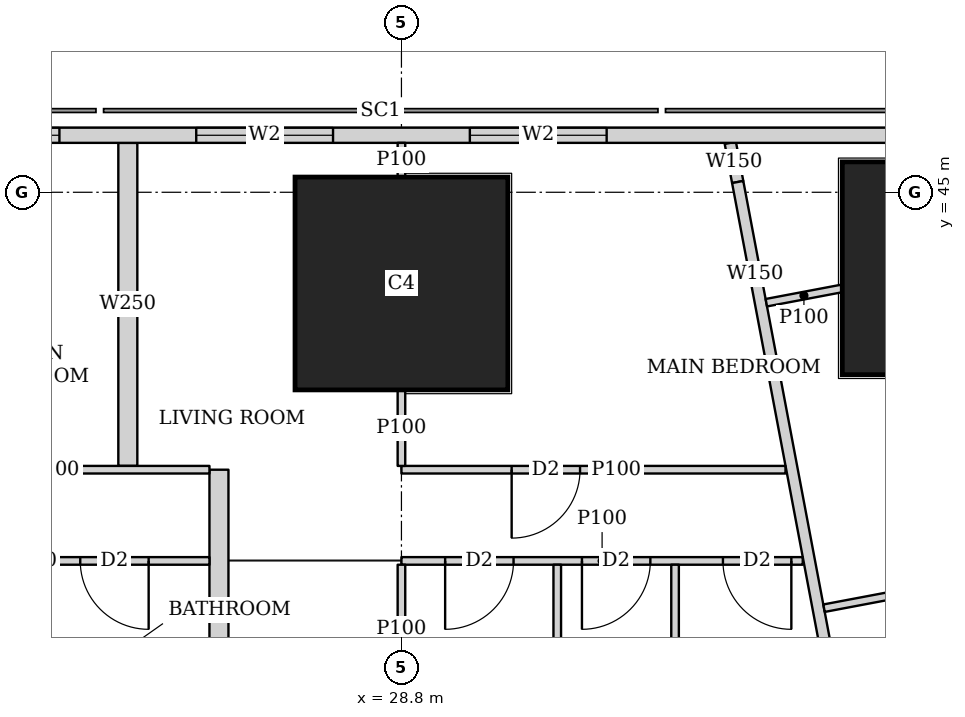
"""IFC4 building model, lengths in metres.
Left out: names, types, materials, properties, quantities, classifications, styles, units other than length and angle.
Written with IfcOpenShell. Run it as: python <this file> out.ifc"""

import sys

from ifc_helpers import new_model, si_unit, direction, frame, frame_2d, origin, origin_2d, place, context, subcontext, project, spatial, rectangle, extrude, element, fill, save


model = new_model("IFC4")
c1 = context("Model", 3, precision=1e-05, world=origin(), true_north=direction((0.0, 1.0)))
c2 = subcontext(c1, "Body", "Model", "MODEL_VIEW")
j1 = project(units=[si_unit("LENGTHUNIT", "METRE"), si_unit("PLANEANGLEUNIT", "RADIAN")], contexts=[c1])
p1 = place(None, origin())
s1 = spatial("IfcSite", under=j1, at=p1, CompositionType="ELEMENT")
p2 = place(p1, origin())
s2 = spatial("IfcBuilding", under=s1, at=p2, CompositionType="ELEMENT")
p3 = place(p2, frame((0.0, 0.0, 68.75)))
s3 = spatial("IfcBuildingStorey", under=s2, at=p3, CompositionType="ELEMENT", Elevation=68.75)
for number, where, z_axis, x_axis in (
    (1, (28.8, 43.8, 0.0), (0.0, 0.0, 1.0), (1.0, 0.0, 0.0)),
    (2, (36.0, 44.0, 0.0), (0.0, 0.0, 1.0), (1.0, 0.0, 0.0)),
):
    element("IfcColumn", number, at=place(p3, frame(where, z_axis=z_axis, x_axis=x_axis)), inside=s3, PredefinedType="COLUMN", context=c2, shape_type="SweptSolid", body=[
        extrude(rectangle(XDim=2.8, YDim=2.8, at=origin_2d()), origin(), (0.0, 0.0, 1.0), 3.75),
    ])
p4 = place(p3, frame((40.106, 45.75, 0.0), z_axis=(0.0, 0.0, 1.0), x_axis=(-1.0, 0.0, 0.0)))
e3 = element("IfcWall", 3, at=p4, inside=s3, PredefinedType="SOLIDWALL", context=c2, shape_type="SweptSolid", body=[
    extrude(rectangle(XDim=37.943, YDim=0.2, at=frame_2d((18.971, 0.0))), origin(), (0.0, 0.0, 1.0), 3.45),
])
p5 = place(p4, frame((8.606, 0.0, 0.9)))
e4 = element("IfcOpeningElement", 4, at=p5, cuts=e3, PredefinedType="OPENING", context=c2, shape_type="SweptSolid", body=[
    extrude(rectangle(XDim=1.8, YDim=1.5, at=frame_2d((0.9, 0.75))), frame((0.0, 0.11, 0.0), z_axis=(0.0, -1.0, 0.0), x_axis=(1.0, 0.0, 0.0)), (0.0, 0.0, 1.0), 0.22),
])
p6 = place(p4, frame((12.206, 0.0, 0.9)))
e5 = element("IfcOpeningElement", 5, at=p6, cuts=e3, PredefinedType="OPENING", context=c2, shape_type="SweptSolid", body=[
    extrude(rectangle(XDim=1.8, YDim=1.5, at=frame_2d((0.9, 0.75))), frame((0.0, 0.11, 0.0), z_axis=(0.0, -1.0, 0.0), x_axis=(1.0, 0.0, 0.0)), (0.0, 0.0, 1.0), 0.22),
])
p7 = place(p4, frame((15.806, 0.0, 0.9)))
e6 = element("IfcOpeningElement", 6, at=p7, cuts=e3, PredefinedType="OPENING", context=c2, shape_type="SweptSolid", body=[
    extrude(rectangle(XDim=1.8, YDim=1.5, at=frame_2d((0.9, 0.75))), frame((0.0, 0.11, 0.0), z_axis=(0.0, -1.0, 0.0), x_axis=(1.0, 0.0, 0.0)), (0.0, 0.0, 1.0), 0.22),
])
p8 = place(p4, frame((19.406, 0.0, 0.9)))
e7 = element("IfcOpeningElement", 7, at=p8, cuts=e3, PredefinedType="OPENING", context=c2, shape_type="SweptSolid", body=[
    extrude(rectangle(XDim=1.8, YDim=1.5, at=frame_2d((0.9, 0.75))), frame((0.0, 0.11, 0.0), z_axis=(0.0, -1.0, 0.0), x_axis=(1.0, 0.0, 0.0)), (0.0, 0.0, 1.0), 0.22),
])
p9 = place(p4, frame((23.006, 0.0, 0.9)))
e8 = element("IfcOpeningElement", 8, at=p9, cuts=e3, PredefinedType="OPENING", context=c2, shape_type="SweptSolid", body=[
    extrude(rectangle(XDim=1.8, YDim=1.5, at=frame_2d((0.9, 0.75))), frame((0.0, 0.11, 0.0), z_axis=(0.0, -1.0, 0.0), x_axis=(1.0, 0.0, 0.0)), (0.0, 0.0, 1.0), 0.22),
])
p10 = place(p4, frame((26.606, 0.0, 0.9)))
e9 = element("IfcOpeningElement", 9, at=p10, cuts=e3, PredefinedType="OPENING", context=c2, shape_type="SweptSolid", body=[
    extrude(rectangle(XDim=1.8, YDim=1.5, at=frame_2d((0.9, 0.75))), frame((0.0, 0.11, 0.0), z_axis=(0.0, -1.0, 0.0), x_axis=(1.0, 0.0, 0.0)), (0.0, 0.0, 1.0), 0.22),
])
p11 = place(p3, frame((33.127, 45.65, 0.0), z_axis=(0.0, 0.0, 1.0), x_axis=(0.185441815104, -0.982655246366, 0.0)))
e10 = element("IfcWall", 10, at=p11, inside=s3, PredefinedType="SOLIDWALL", context=c2, shape_type="SweptSolid", body=[
    extrude(rectangle(XDim=0.524, YDim=0.15, at=frame_2d((0.262, 0.0))), origin(), (0.0, 0.0, 1.0), 3.45),
])
p12 = place(p3, frame((33.224, 45.135, 0.0), z_axis=(0.0, 0.0, 1.0), x_axis=(0.185681462868, -0.982609990967, 0.0)))
e11 = element("IfcWall", 11, at=p12, inside=s3, PredefinedType="SOLIDWALL", context=c2, shape_type="SweptSolid", body=[
    extrude(rectangle(XDim=2.455, YDim=0.15, at=frame_2d((1.228, 0.0))), origin(), (0.0, 0.0, 1.0), 2.0),
])
p13 = place(p3, frame((33.68, 42.723, 0.0), z_axis=(0.0, 0.0, 1.0), x_axis=(0.185624129307, -0.98262082342, 0.0)))
e12 = element("IfcWall", 12, at=p13, inside=s3, PredefinedType="SOLIDWALL", context=c2, shape_type="SweptSolid", body=[
    extrude(rectangle(XDim=41.051, YDim=0.15, at=frame_2d((20.526, 0.0))), origin(), (0.0, 0.0, 1.0), 2.45),
])
p14 = place(p13, frame((13.577, 0.0, 0.0)))
e13 = element("IfcOpeningElement", 13, at=p14, cuts=e12, PredefinedType="OPENING", context=c2, shape_type="SweptSolid", body=[
    extrude(rectangle(XDim=1.0, YDim=2.1, at=frame_2d((0.5, 1.05))), frame((0.0, 0.085, 0.0), z_axis=(0.0, -1.0, 0.0), x_axis=(1.0, 0.0, 0.0)), (0.0, 0.0, 1.0), 0.17),
])
p15 = place(p13, frame((17.394, 0.0, 0.0)))
e14 = element("IfcOpeningElement", 14, at=p15, cuts=e12, PredefinedType="OPENING", context=c2, shape_type="SweptSolid", body=[
    extrude(rectangle(XDim=1.0, YDim=2.1, at=frame_2d((0.5, 1.05))), frame((0.0, 0.085, 0.0), z_axis=(0.0, -1.0, 0.0), x_axis=(1.0, 0.0, 0.0)), (0.0, 0.0, 1.0), 0.17),
])
p16 = place(p13, frame((26.758, 0.0, 0.0)))
e15 = element("IfcOpeningElement", 15, at=p16, cuts=e12, PredefinedType="OPENING", context=c2, shape_type="SweptSolid", body=[
    extrude(rectangle(XDim=1.0, YDim=2.1, at=frame_2d((0.5, 1.05))), frame((0.0, 0.085, 0.0), z_axis=(0.0, -1.0, 0.0), x_axis=(1.0, 0.0, 0.0)), (0.0, 0.0, 1.0), 0.17),
])
p17 = place(p13, frame((32.193, 0.0, 0.0)))
e16 = element("IfcOpeningElement", 16, at=p17, cuts=e12, PredefinedType="OPENING", context=c2, shape_type="SweptSolid", body=[
    extrude(rectangle(XDim=1.0, YDim=2.1, at=frame_2d((0.5, 1.05))), frame((0.0, 0.085, 0.0), z_axis=(0.0, -1.0, 0.0), x_axis=(1.0, 0.0, 0.0)), (0.0, 0.0, 1.0), 0.17),
])
p18 = place(p3, frame((34.59, 43.734, 0.0), z_axis=(0.0, 0.0, 1.0), x_axis=(-0.982632457012, -0.185562535081, 0.0)))
e17 = element("IfcWall", 17, at=p18, inside=s3, PredefinedType="PARTITIONING", context=c2, shape_type="SweptSolid", body=[
    extrude(rectangle(XDim=1.007, YDim=0.1, at=frame_2d((0.503, 0.0))), origin(), (0.0, 0.0, 1.0), 2.0),
])
p19 = place(p3, frame((37.824, 40.182, 0.0), z_axis=(0.0, 0.0, 1.0), x_axis=(-0.982648794755, -0.185475998897, 0.0)))
e18 = element("IfcWall", 18, at=p19, inside=s3, PredefinedType="PARTITIONING", context=c2, shape_type="SweptSolid", body=[
    extrude(rectangle(XDim=3.525, YDim=0.1, at=frame_2d((1.763, 0.0))), origin(), (0.0, 0.0, 1.0), 3.45),
])
p20 = place(p3, frame((21.6, 41.35, 0.0), z_axis=(0.0, 0.0, 1.0), x_axis=(1.0, 0.0, 0.0)))
e19 = element("IfcWall", 19, at=p20, inside=s3, PredefinedType="PARTITIONING", context=c2, shape_type="SweptSolid", body=[
    extrude(rectangle(XDim=4.674, YDim=0.1, at=frame_2d((2.337, 0.0))), origin(), (0.0, 0.0, 1.0), 3.45),
])
p21 = place(p20, frame((1.45, 0.0, 0.0)))
e20 = element("IfcOpeningElement", 20, at=p21, cuts=e19, PredefinedType="OPENING", context=c2, shape_type="SweptSolid", body=[
    extrude(rectangle(XDim=0.9, YDim=2.1, at=frame_2d((0.45, 1.05))), frame((0.0, 0.06, 0.0), z_axis=(0.0, -1.0, 0.0), x_axis=(1.0, 0.0, 0.0)), (0.0, 0.0, 1.0), 0.12),
])
p22 = place(p3, frame((21.6, 40.15, 0.0), z_axis=(0.0, 0.0, 1.0), x_axis=(1.0, 0.0, 0.0)))
e21 = element("IfcWall", 21, at=p22, inside=s3, PredefinedType="PARTITIONING", context=c2, shape_type="SweptSolid", body=[
    extrude(rectangle(XDim=4.674, YDim=0.1, at=frame_2d((2.337, 0.0))), origin(), (0.0, 0.0, 1.0), 3.45),
])
p23 = place(p22, frame((0.575, 0.0, 0.0)))
e22 = element("IfcOpeningElement", 22, at=p23, cuts=e21, PredefinedType="OPENING", context=c2, shape_type="SweptSolid", body=[
    extrude(rectangle(XDim=0.9, YDim=2.1, at=frame_2d((0.45, 1.05))), frame((0.0, 0.06, 0.0), z_axis=(0.0, -1.0, 0.0), x_axis=(1.0, 0.0, 0.0)), (0.0, 0.0, 1.0), 0.12),
])
p24 = place(p22, frame((2.974, 0.0, 0.0)))
e23 = element("IfcOpeningElement", 23, at=p24, cuts=e21, PredefinedType="OPENING", context=c2, shape_type="SweptSolid", body=[
    extrude(rectangle(XDim=0.9, YDim=2.1, at=frame_2d((0.45, 1.05))), frame((0.0, 0.06, 0.0), z_axis=(0.0, -1.0, 0.0), x_axis=(1.0, 0.0, 0.0)), (0.0, 0.0, 1.0), 0.12),
])
p25 = place(p3, frame((28.8, 41.35, 0.0), z_axis=(0.0, 0.0, 1.0), x_axis=(1.0, 0.0, 0.0)))
e24 = element("IfcWall", 24, at=p25, inside=s3, PredefinedType="PARTITIONING", context=c2, shape_type="SweptSolid", body=[
    extrude(rectangle(XDim=5.053, YDim=0.1, at=frame_2d((2.526, 0.0))), origin(), (0.0, 0.0, 1.0), 3.45),
])
p26 = place(p25, frame((1.45, 0.0, 0.0)))
e25 = element("IfcOpeningElement", 25, at=p26, cuts=e24, PredefinedType="OPENING", context=c2, shape_type="SweptSolid", body=[
    extrude(rectangle(XDim=0.9, YDim=2.1, at=frame_2d((0.45, 1.05))), frame((0.0, 0.06, 0.0), z_axis=(0.0, -1.0, 0.0), x_axis=(1.0, 0.0, 0.0)), (0.0, 0.0, 1.0), 0.12),
])
p27 = place(p3, frame((28.8, 40.15, 0.0), z_axis=(0.0, 0.0, 1.0), x_axis=(1.0, 0.0, 0.0)))
e26 = element("IfcWall", 26, at=p27, inside=s3, PredefinedType="PARTITIONING", context=c2, shape_type="SweptSolid", body=[
    extrude(rectangle(XDim=5.28, YDim=0.1, at=frame_2d((2.64, 0.0))), origin(), (0.0, 0.0, 1.0), 3.45),
])
p28 = place(p27, frame((0.575, 0.0, 0.0)))
e27 = element("IfcOpeningElement", 27, at=p28, cuts=e26, PredefinedType="OPENING", context=c2, shape_type="SweptSolid", body=[
    extrude(rectangle(XDim=0.9, YDim=2.1, at=frame_2d((0.45, 1.05))), frame((0.0, 0.06, 0.0), z_axis=(0.0, -1.0, 0.0), x_axis=(1.0, 0.0, 0.0)), (0.0, 0.0, 1.0), 0.12),
])
p29 = place(p27, frame((4.23, 0.0, 0.0)))
e28 = element("IfcOpeningElement", 28, at=p29, cuts=e26, PredefinedType="OPENING", context=c2, shape_type="SweptSolid", body=[
    extrude(rectangle(XDim=0.9, YDim=2.1, at=frame_2d((0.45, 1.05))), frame((0.0, 0.06, 0.0), z_axis=(0.0, -1.0, 0.0), x_axis=(1.0, 0.0, 0.0)), (0.0, 0.0, 1.0), 0.12),
])
p30 = place(p27, frame((2.375, 0.0, 0.0)))
e29 = element("IfcOpeningElement", 29, at=p30, cuts=e26, PredefinedType="OPENING", context=c2, shape_type="SweptSolid", body=[
    extrude(rectangle(XDim=0.9, YDim=2.1, at=frame_2d((0.45, 1.05))), frame((0.0, 0.06, 0.0), z_axis=(0.0, -1.0, 0.0), x_axis=(1.0, 0.0, 0.0)), (0.0, 0.0, 1.0), 0.12),
])
p31 = place(p3, frame((28.8, 41.4, 0.0), z_axis=(0.0, 0.0, 1.0), x_axis=(0.0, 1.0, 0.0)))
e30 = element("IfcWall", 30, at=p31, inside=s3, PredefinedType="PARTITIONING", context=c2, shape_type="SweptSolid", body=[
    extrude(rectangle(XDim=0.999, YDim=0.1, at=frame_2d((0.5, 0.0))), origin(), (0.0, 0.0, 1.0), 3.45),
])
p32 = place(p3, frame((28.8, 45.201, 0.0), z_axis=(0.0, 0.0, 1.0), x_axis=(0.0, 1.0, 0.0)))
e31 = element("IfcWall", 31, at=p32, inside=s3, PredefinedType="PARTITIONING", context=c2, shape_type="SweptSolid", body=[
    extrude(rectangle(XDim=0.449, YDim=0.1, at=frame_2d((0.225, 0.0))), origin(), (0.0, 0.0, 1.0), 3.45),
])
p33 = place(p3, frame((28.8, 38.401, 0.0), z_axis=(0.0, 0.0, 1.0), x_axis=(0.0, 1.0, 0.0)))
e32 = element("IfcWall", 32, at=p33, inside=s3, PredefinedType="PARTITIONING", context=c2, shape_type="SweptSolid", body=[
    extrude(rectangle(XDim=1.699, YDim=0.1, at=frame_2d((0.85, 0.0))), origin(), (0.0, 0.0, 1.0), 3.45),
])
for number, where, z_axis, x_axis in (
    (33, (32.4, 36.575, 0.0), (0.0, 0.0, 1.0), (0.0, 1.0, 0.0)),
    (34, (30.85, 36.575, 0.0), (0.0, 0.0, 1.0), (0.0, 1.0, 0.0)),
):
    element("IfcWall", number, at=place(p3, frame(where, z_axis=z_axis, x_axis=x_axis)), inside=s3, PredefinedType="PARTITIONING", context=c2, shape_type="SweptSolid", body=[
        extrude(rectangle(XDim=3.525, YDim=0.1, at=frame_2d((1.763, 0.0))), origin(), (0.0, 0.0, 1.0), 3.45),
    ])
p34 = place(p3, frame((25.2, 41.4, 0.0), z_axis=(0.0, 0.0, 1.0), x_axis=(0.0, 1.0, 0.0)))
e35 = element("IfcWall", 35, at=p34, inside=s3, PredefinedType="SOLIDWALL", context=c2, shape_type="SweptSolid", body=[
    extrude(rectangle(XDim=4.25, YDim=0.25, at=frame_2d((2.125, 0.0))), origin(), (0.0, 0.0, 1.0), 2.0),
])
p35 = place(p3, frame((26.399, 36.575, 0.0), z_axis=(0.0, 0.0, 1.0), x_axis=(0.0, 1.0, 0.0)))
e36 = element("IfcWall", 36, at=p35, inside=s3, PredefinedType="SOLIDWALL", context=c2, shape_type="SweptSolid", body=[
    extrude(rectangle(XDim=4.775, YDim=0.25, at=frame_2d((2.388, 0.0))), origin(), (0.0, 0.0, 1.0), 3.45),
])
p36 = place(p5, origin())
e37 = element("IfcWindow", 37, at=p36, inside=s3, PartitioningType="SINGLE_PANEL", PredefinedType="WINDOW", context=c2, shape_type="SweptSolid", body=[
    extrude(rectangle(XDim=1.8, YDim=1.5, at=frame_2d((0.9, 0.75))), frame((0.0, 0.03, 0.0), z_axis=(0.0, -1.0, 0.0), x_axis=(1.0, 0.0, 0.0)), (0.0, 0.0, 1.0), 0.06),
])
fill(e4, e37)
p37 = place(p6, origin())
e38 = element("IfcWindow", 38, at=p37, inside=s3, PartitioningType="SINGLE_PANEL", PredefinedType="WINDOW", context=c2, shape_type="SweptSolid", body=[
    extrude(rectangle(XDim=1.8, YDim=1.5, at=frame_2d((0.9, 0.75))), frame((0.0, 0.03, 0.0), z_axis=(0.0, -1.0, 0.0), x_axis=(1.0, 0.0, 0.0)), (0.0, 0.0, 1.0), 0.06),
])
fill(e5, e38)
p38 = place(p7, origin())
e39 = element("IfcWindow", 39, at=p38, inside=s3, PartitioningType="SINGLE_PANEL", PredefinedType="WINDOW", context=c2, shape_type="SweptSolid", body=[
    extrude(rectangle(XDim=1.8, YDim=1.5, at=frame_2d((0.9, 0.75))), frame((0.0, 0.03, 0.0), z_axis=(0.0, -1.0, 0.0), x_axis=(1.0, 0.0, 0.0)), (0.0, 0.0, 1.0), 0.06),
])
fill(e6, e39)
p39 = place(p24, origin())
e40 = element("IfcDoor", 40, at=p39, inside=s3, OperationType="SINGLE_SWING_LEFT", PredefinedType="DOOR", context=c2, shape_type="SweptSolid", body=[
    extrude(rectangle(XDim=0.9, YDim=2.1, at=frame_2d((0.45, 1.05))), frame((0.0, 0.025, 0.0), z_axis=(0.0, -1.0, 0.0), x_axis=(1.0, 0.0, 0.0)), (0.0, 0.0, 1.0), 0.05),
])
fill(e23, e40)
p40 = place(p26, origin())
e41 = element("IfcDoor", 41, at=p40, inside=s3, OperationType="SINGLE_SWING_RIGHT", PredefinedType="DOOR", context=c2, shape_type="SweptSolid", body=[
    extrude(rectangle(XDim=0.9, YDim=2.1, at=frame_2d((0.45, 1.05))), frame((0.0, 0.025, 0.0), z_axis=(0.0, -1.0, 0.0), x_axis=(1.0, 0.0, 0.0)), (0.0, 0.0, 1.0), 0.05),
])
fill(e25, e41)
p41 = place(p28, origin())
e42 = element("IfcDoor", 42, at=p41, inside=s3, OperationType="SINGLE_SWING_RIGHT", PredefinedType="DOOR", context=c2, shape_type="SweptSolid", body=[
    extrude(rectangle(XDim=0.9, YDim=2.1, at=frame_2d((0.45, 1.05))), frame((0.0, 0.025, 0.0), z_axis=(0.0, -1.0, 0.0), x_axis=(1.0, 0.0, 0.0)), (0.0, 0.0, 1.0), 0.05),
])
fill(e27, e42)
p42 = place(p29, origin())
e43 = element("IfcDoor", 43, at=p42, inside=s3, OperationType="SINGLE_SWING_LEFT", PredefinedType="DOOR", context=c2, shape_type="SweptSolid", body=[
    extrude(rectangle(XDim=0.9, YDim=2.1, at=frame_2d((0.45, 1.05))), frame((0.0, 0.025, 0.0), z_axis=(0.0, -1.0, 0.0), x_axis=(1.0, 0.0, 0.0)), (0.0, 0.0, 1.0), 0.05),
])
fill(e28, e43)
p43 = place(p30, origin())
e44 = element("IfcDoor", 44, at=p43, inside=s3, OperationType="SINGLE_SWING_RIGHT", PredefinedType="DOOR", context=c2, shape_type="SweptSolid", body=[
    extrude(rectangle(XDim=0.9, YDim=2.1, at=frame_2d((0.45, 1.05))), frame((0.0, 0.025, 0.0), z_axis=(0.0, -1.0, 0.0), x_axis=(1.0, 0.0, 0.0)), (0.0, 0.0, 1.0), 0.05),
])
fill(e29, e44)
save(model, sys.argv[1])
